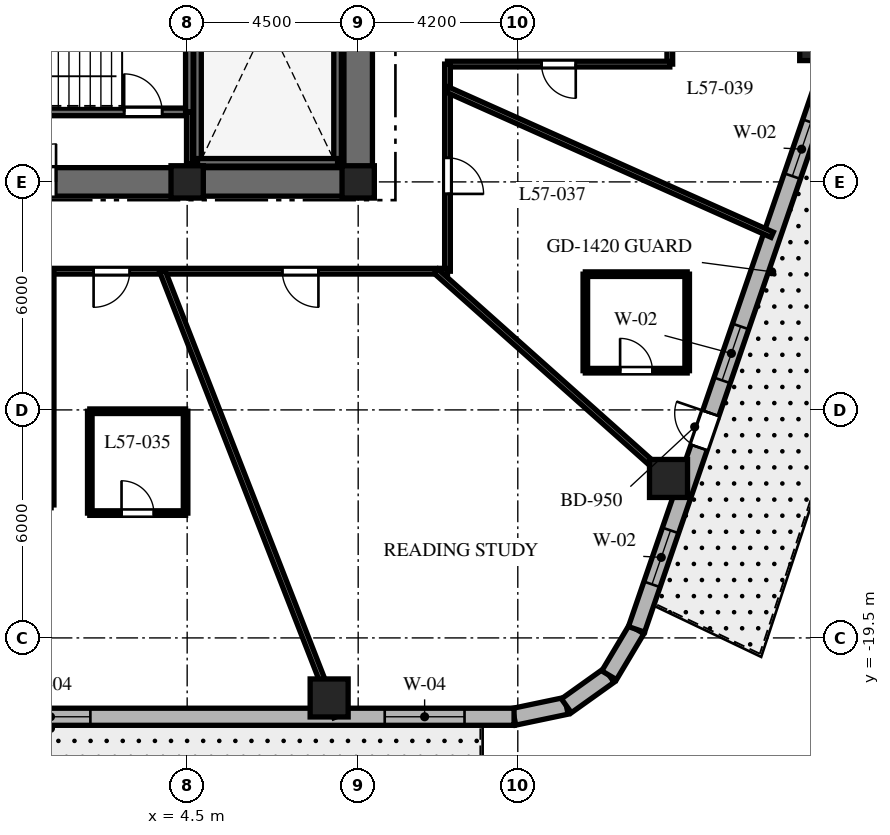
"""IFC4 building model, lengths in metres.
Left out: names, types, materials, properties, quantities, classifications, styles, units other than length and angle.
Written with IfcOpenShell. Run it as: python <this file> out.ifc"""

import sys

from ifc_helpers import new_model, si_unit, direction, frame, frame_2d, origin, origin_2d, place, context, subcontext, project, spatial, rectangle, extrude, element, fill, save


model = new_model("IFC4")
c1 = context("Model", 3, precision=1e-05, world=origin(), true_north=direction((0.0, 1.0)))
c2 = subcontext(c1, "Body", "Model", "MODEL_VIEW")
j1 = project(units=[si_unit("LENGTHUNIT", "METRE"), si_unit("PLANEANGLEUNIT", "RADIAN")], contexts=[c1])
p1 = place(None, origin())
s1 = spatial("IfcSite", under=j1, at=p1, CompositionType="ELEMENT")
p2 = place(p1, origin())
s2 = spatial("IfcBuilding", under=s1, at=p2, CompositionType="ELEMENT")
p3 = place(p2, frame((0.0, 0.0, 229.3)))
s3 = spatial("IfcBuildingStorey", under=s2, at=p3, CompositionType="ELEMENT", Elevation=229.3)
p4 = place(p3, frame((-9.375, -7.5, 0.0), z_axis=(0.0, 0.0, 1.0), x_axis=(1.0, 0.0, 0.0)))
e1 = element("IfcWall", 1, at=p4, inside=s3, PredefinedType="SHEAR", context=c2, shape_type="SweptSolid", body=[
    extrude(rectangle(XDim=18.75, YDim=0.75, at=frame_2d((9.375, 0.0))), origin(), (0.0, 0.0, 1.0), 3.8),
])
p5 = place(p4, frame((9.425, 0.0, 0.0)))
e2 = element("IfcOpeningElement", 2, at=p5, cuts=e1, PredefinedType="OPENING", context=c2, shape_type="SweptSolid", body=[
    extrude(rectangle(XDim=1.0, YDim=2.15, at=frame_2d((0.5, 1.075))), frame((0.0, 0.385, 0.0), z_axis=(0.0, -1.0, 0.0), x_axis=(1.0, 0.0, 0.0)), (0.0, 0.0, 1.0), 0.77),
])
p6 = place(p3, frame((9.0, -7.125, 0.0), z_axis=(0.0, 0.0, 1.0), x_axis=(0.0, 1.0, 0.0)))
e3 = element("IfcWall", 3, at=p6, inside=s3, PredefinedType="SHEAR", context=c2, shape_type="SweptSolid", body=[
    extrude(rectangle(XDim=14.25, YDim=0.75, at=frame_2d((7.125, 0.0))), origin(), (0.0, 0.0, 1.0), 3.8),
])
p7 = place(p6, frame((10.25, 0.0, 0.0)))
e4 = element("IfcOpeningElement", 4, at=p7, cuts=e3, PredefinedType="OPENING", context=c2, shape_type="SweptSolid", body=[
    extrude(rectangle(XDim=1.05, YDim=2.15, at=frame_2d((0.525, 1.075))), frame((0.0, 0.385, 0.0), z_axis=(0.0, -1.0, 0.0), x_axis=(1.0, 0.0, 0.0)), (0.0, 0.0, 1.0), 0.77),
])
for number, where, z_axis, x_axis in (
    (5, (4.772, -6.985, 0.0), (0.0, 0.0, 1.0), (0.0, 1.0, 0.0)),
    (6, (8.458, -6.985, 0.0), (0.0, 0.0, 1.0), (0.0, 1.0, 0.0)),
):
    element("IfcWall", number, at=place(p3, frame(where, z_axis=z_axis, x_axis=x_axis)), inside=s3, PredefinedType="SHEAR", context=c2, shape_type="SweptSolid", body=[
        extrude(rectangle(XDim=9.143, YDim=0.2, at=frame_2d((4.572, 0.0))), origin(), (0.0, 0.0, 1.0), 3.8),
    ])
p8 = place(p3, frame((4.772, -6.985, 0.0), z_axis=(0.0, 0.0, 1.0), x_axis=(1.0, 0.0, 0.0)))
e7 = element("IfcWall", 7, at=p8, inside=s3, PredefinedType="SHEAR", context=c2, shape_type="SweptSolid", body=[
    extrude(rectangle(XDim=3.686, YDim=0.2, at=frame_2d((1.843, 0.0))), origin(), (0.0, 0.0, 1.0), 3.8),
])
p9 = place(p3, frame((-4.608, -5.658, 0.0), z_axis=(0.0, 0.0, 1.0), x_axis=(1.0, 0.0, 0.0)))
e8 = element("IfcWall", 8, at=p9, inside=s3, PredefinedType="SHEAR", context=c2, shape_type="SweptSolid", body=[
    extrude(rectangle(XDim=9.166, YDim=0.2, at=frame_2d((4.583, 0.0))), origin(), (0.0, 0.0, 1.0), 3.8),
])
p10 = place(p9, frame((7.45, 0.0, 0.0)))
e9 = element("IfcOpeningElement", 9, at=p10, cuts=e8, PredefinedType="OPENING", context=c2, shape_type="SweptSolid", body=[
    extrude(rectangle(XDim=1.0, YDim=2.15, at=frame_2d((0.5, 1.075))), frame((0.0, 0.11, 0.0), z_axis=(0.0, -1.0, 0.0), x_axis=(1.0, 0.0, 0.0)), (0.0, 0.0, 1.0), 0.22),
])
p11 = place(p3, frame((4.558, -5.658, 0.0), z_axis=(0.0, 0.0, 1.0), x_axis=(0.0, 1.0, 0.0)))
e10 = element("IfcWall", 10, at=p11, inside=s3, PredefinedType="SHEAR", context=c2, shape_type="SweptSolid", body=[
    extrude(rectangle(XDim=3.686, YDim=0.2, at=frame_2d((1.843, 0.0))), origin(), (0.0, 0.0, 1.0), 3.8),
])
for number, where, z_axis, x_axis in (
    (11, (4.5, -7.5, 0.0), (0.0, 0.0, 1.0), (1.0, 0.0, 0.0)),
    (12, (9.0, -7.5, 0.0), (0.0, 0.0, 1.0), (1.0, 0.0, 0.0)),
):
    element("IfcColumn", number, at=place(p3, frame(where, z_axis=z_axis, x_axis=x_axis)), inside=s3, PredefinedType="COLUMN", context=c2, shape_type="SweptSolid", body=[
        extrude(rectangle(XDim=0.85, YDim=0.85, at=origin_2d()), origin(), (0.0, 0.0, 1.0), 3.8),
    ])
for number, where, z_axis, x_axis in (
    (13, (8.236, -21.08, 0.0), (0.0, 0.0, 1.0), (1.0, 0.0, 0.0)),
    (14, (17.166, -15.304, 0.0), (0.0, 0.0, 1.0), (1.0, 0.0, 0.0)),
    (15, (21.118, -3.807, 0.0), (0.0, 0.0, 1.0), (1.0, 0.0, 0.0)),
):
    element("IfcColumn", number, at=place(p3, frame(where, z_axis=z_axis, x_axis=x_axis)), inside=s3, PredefinedType="COLUMN", context=c2, shape_type="SweptSolid", body=[
        extrude(rectangle(XDim=1.0, YDim=1.0, at=origin_2d()), origin(), (0.0, 0.0, 1.0), 3.8),
    ])
p12 = place(p3, frame((13.102, -21.575, 0.0), z_axis=(0.0, 0.0, 1.0), x_axis=(0.978757421505, 0.205021730188, 0.0)))
e16 = element("IfcWall", 16, at=p12, inside=s3, PredefinedType="SOLIDWALL", context=c2, shape_type="SweptSolid", body=[
    extrude(rectangle(XDim=1.406, YDim=0.45, at=frame_2d((0.703, 0.0))), origin(), (0.0, 0.0, 1.0), 3.5),
])
p13 = place(p3, frame((14.478, -21.287, 0.0), z_axis=(0.0, 0.0, 1.0), x_axis=(0.813888518617, 0.58102106611, 0.0)))
e17 = element("IfcWall", 17, at=p13, inside=s3, PredefinedType="SOLIDWALL", context=c2, shape_type="SweptSolid", body=[
    extrude(rectangle(XDim=1.383, YDim=0.45, at=frame_2d((0.691, 0.0))), origin(), (0.0, 0.0, 1.0), 3.5),
])
p14 = place(p3, frame((15.604, -20.483, 0.0), z_axis=(0.0, 0.0, 1.0), x_axis=(0.512222149036, 0.858852996756, 0.0)))
e18 = element("IfcWall", 18, at=p14, inside=s3, PredefinedType="SOLIDWALL", context=c2, shape_type="SweptSolid", body=[
    extrude(rectangle(XDim=1.406, YDim=0.45, at=frame_2d((0.703, 0.0))), origin(), (0.0, 0.0, 1.0), 3.5),
])
p15 = place(p3, frame((-11.298, -21.575, 0.0), z_axis=(0.0, 0.0, 1.0), x_axis=(1.0, 0.0, 0.0)))
e19 = element("IfcWall", 19, at=p15, inside=s3, PredefinedType="SOLIDWALL", context=c2, shape_type="SweptSolid", body=[
    extrude(rectangle(XDim=24.399, YDim=0.45, at=frame_2d((12.2, 0.0))), origin(), (0.0, 0.0, 1.0), 3.5),
])
p16 = place(p15, frame((2.55, 0.0, 0.0)))
e20 = element("IfcOpeningElement", 20, at=p16, cuts=e19, PredefinedType="OPENING", context=c2, shape_type="SweptSolid", body=[
    extrude(rectangle(XDim=1.0, YDim=2.15, at=frame_2d((0.5, 1.075))), frame((0.0, 0.235, 0.0), z_axis=(0.0, -1.0, 0.0), x_axis=(1.0, 0.0, 0.0)), (0.0, 0.0, 1.0), 0.47),
])
p17 = place(p15, frame((11.151, 0.0, 0.8)))
e21 = element("IfcOpeningElement", 21, at=p17, cuts=e19, PredefinedType="OPENING", context=c2, shape_type="SweptSolid", body=[
    extrude(rectangle(XDim=2.1, YDim=1.85, at=frame_2d((1.05, 0.925))), frame((0.0, 0.235, 0.0), z_axis=(0.0, -1.0, 0.0), x_axis=(1.0, 0.0, 0.0)), (0.0, 0.0, 1.0), 0.47),
])
p18 = place(p15, frame((20.996, 0.0, 0.8)))
e22 = element("IfcOpeningElement", 22, at=p18, cuts=e19, PredefinedType="OPENING", context=c2, shape_type="SweptSolid", body=[
    extrude(rectangle(XDim=2.1, YDim=1.85, at=frame_2d((1.05, 0.925))), frame((0.0, 0.235, 0.0), z_axis=(0.0, -1.0, 0.0), x_axis=(1.0, 0.0, 0.0)), (0.0, 0.0, 1.0), 0.47),
])
p19 = place(p3, frame((16.324, -19.275, 0.0), z_axis=(0.0, 0.0, 1.0), x_axis=(0.325083142304, 0.945685439557, 0.0)))
e23 = element("IfcWall", 23, at=p19, inside=s3, PredefinedType="SOLIDWALL", context=c2, shape_type="SweptSolid", body=[
    extrude(rectangle(XDim=20.224, YDim=0.45, at=frame_2d((10.112, 0.0))), origin(), (0.0, 0.0, 1.0), 3.5),
])
p20 = place(p19, frame((5.062, 0.0, 0.0)))
e24 = element("IfcOpeningElement", 24, at=p20, cuts=e23, PredefinedType="OPENING", context=c2, shape_type="SweptSolid", body=[
    extrude(rectangle(XDim=0.95, YDim=2.15, at=frame_2d((0.475, 1.075))), frame((0.0, 0.235, 0.0), z_axis=(0.0, -1.0, 0.0), x_axis=(1.0, 0.0, 0.0)), (0.0, 0.0, 1.0), 0.47),
])
p21 = place(p19, frame((1.253, 0.0, 0.8)))
e25 = element("IfcOpeningElement", 25, at=p21, cuts=e23, PredefinedType="OPENING", context=c2, shape_type="SweptSolid", body=[
    extrude(rectangle(XDim=1.5, YDim=1.8, at=frame_2d((0.75, 0.9))), frame((0.0, 0.235, 0.0), z_axis=(0.0, -1.0, 0.0), x_axis=(1.0, 0.0, 0.0)), (0.0, 0.0, 1.0), 0.47),
])
p22 = place(p19, frame((6.929, 0.0, 0.8)))
e26 = element("IfcOpeningElement", 26, at=p22, cuts=e23, PredefinedType="OPENING", context=c2, shape_type="SweptSolid", body=[
    extrude(rectangle(XDim=1.5, YDim=1.8, at=frame_2d((0.75, 0.9))), frame((0.0, 0.235, 0.0), z_axis=(0.0, -1.0, 0.0), x_axis=(1.0, 0.0, 0.0)), (0.0, 0.0, 1.0), 0.47),
])
p23 = place(p19, frame((12.612, 0.0, 0.8)))
e27 = element("IfcOpeningElement", 27, at=p23, cuts=e23, PredefinedType="OPENING", context=c2, shape_type="SweptSolid", body=[
    extrude(rectangle(XDim=1.5, YDim=1.8, at=frame_2d((0.75, 0.9))), frame((0.0, 0.235, 0.0), z_axis=(0.0, -1.0, 0.0), x_axis=(1.0, 0.0, 0.0)), (0.0, 0.0, 1.0), 0.47),
])
p24 = place(p19, frame((17.418, 0.0, 0.8)))
e28 = element("IfcOpeningElement", 28, at=p24, cuts=e23, PredefinedType="OPENING", context=c2, shape_type="SweptSolid", body=[
    extrude(rectangle(XDim=1.5, YDim=1.8, at=frame_2d((0.75, 0.9))), frame((0.0, 0.235, 0.0), z_axis=(0.0, -1.0, 0.0), x_axis=(1.0, 0.0, 0.0)), (0.0, 0.0, 1.0), 0.47),
])
p25 = place(p3, frame((4.558, -7.02, 0.0), z_axis=(0.0, 0.0, 1.0), x_axis=(0.0, 1.0, 0.0)))
e29 = element("IfcWall", 29, at=p25, inside=s3, PredefinedType="PARTITIONING", context=c2, shape_type="SweptSolid", body=[
    extrude(rectangle(XDim=1.362, YDim=0.15, at=frame_2d((0.681, 0.0))), origin(), (0.0, 0.0, 1.0), 3.5),
])
p26 = place(p3, frame((17.2, -2.55, 0.0), z_axis=(0.0, 0.0, 1.0), x_axis=(0.0, -1.0, 0.0)))
e30 = element("IfcWall", 30, at=p26, inside=s3, PredefinedType="PARTITIONING", context=c2, shape_type="SweptSolid", body=[
    extrude(rectangle(XDim=1.85, YDim=0.15, at=frame_2d((0.925, 0.0))), origin(), (0.0, 0.0, 1.0), 2.94),
])
p27 = place(p3, frame((17.2, -4.4, 0.0), z_axis=(0.0, 0.0, 1.0), x_axis=(-1.0, 0.0, 0.0)))
e31 = element("IfcWall", 31, at=p27, inside=s3, PredefinedType="PARTITIONING", context=c2, shape_type="SweptSolid", body=[
    extrude(rectangle(XDim=5.85, YDim=0.15, at=frame_2d((2.925, 0.0))), origin(), (0.0, 0.0, 1.0), 2.94),
])
p28 = place(p27, frame((2.475, 0.0, 0.0)))
e32 = element("IfcOpeningElement", 32, at=p28, cuts=e31, PredefinedType="OPENING", context=c2, shape_type="SweptSolid", body=[
    extrude(rectangle(XDim=0.9, YDim=2.03, at=frame_2d((0.45, 1.015))), frame((0.0, 0.085, 0.0), z_axis=(0.0, -1.0, 0.0), x_axis=(1.0, 0.0, 0.0)), (0.0, 0.0, 1.0), 0.17),
])
p29 = place(p3, frame((11.35, -4.4, 0.0), z_axis=(0.0, 0.0, 1.0), x_axis=(0.0, -1.0, 0.0)))
e33 = element("IfcWall", 33, at=p29, inside=s3, PredefinedType="PARTITIONING", context=c2, shape_type="SweptSolid", body=[
    extrude(rectangle(XDim=5.45, YDim=0.15, at=frame_2d((2.725, 0.0))), origin(), (0.0, 0.0, 1.0), 2.99),
])
p30 = place(p29, frame((2.466, 0.0, 0.0)))
e34 = element("IfcOpeningElement", 34, at=p30, cuts=e33, PredefinedType="OPENING", context=c2, shape_type="SweptSolid", body=[
    extrude(rectangle(XDim=0.95, YDim=2.03, at=frame_2d((0.475, 1.015))), frame((0.0, 0.085, 0.0), z_axis=(0.0, -1.0, 0.0), x_axis=(1.0, 0.0, 0.0)), (0.0, 0.0, 1.0), 0.17),
])
p31 = place(p3, frame((11.35, -9.85, 0.0), z_axis=(0.0, 0.0, 1.0), x_axis=(-1.0, 0.0, 0.0)))
e35 = element("IfcWall", 35, at=p31, inside=s3, PredefinedType="PARTITIONING", context=c2, shape_type="SweptSolid", body=[
    extrude(rectangle(XDim=10.43, YDim=0.15, at=frame_2d((5.215, 0.0))), origin(), (0.0, 0.0, 1.0), 2.99),
])
p32 = place(p31, frame((8.362, 0.0, 0.0)))
e36 = element("IfcOpeningElement", 36, at=p32, cuts=e35, PredefinedType="OPENING", context=c2, shape_type="SweptSolid", body=[
    extrude(rectangle(XDim=0.95, YDim=2.03, at=frame_2d((0.475, 1.015))), frame((0.0, 0.085, 0.0), z_axis=(0.0, -1.0, 0.0), x_axis=(1.0, 0.0, 0.0)), (0.0, 0.0, 1.0), 0.17),
])
p33 = place(p31, frame((3.396, 0.0, 0.0)))
e37 = element("IfcOpeningElement", 37, at=p33, cuts=e35, PredefinedType="OPENING", context=c2, shape_type="SweptSolid", body=[
    extrude(rectangle(XDim=0.95, YDim=2.03, at=frame_2d((0.475, 1.015))), frame((0.0, 0.085, 0.0), z_axis=(0.0, -1.0, 0.0), x_axis=(1.0, 0.0, 0.0)), (0.0, 0.0, 1.0), 0.17),
])
p34 = place(p3, frame((0.92, -9.85, 0.0), z_axis=(0.0, 0.0, 1.0), x_axis=(0.0, -1.0, 0.0)))
e38 = element("IfcWall", 38, at=p34, inside=s3, PredefinedType="PARTITIONING", context=c2, shape_type="SweptSolid", body=[
    extrude(rectangle(XDim=6.15, YDim=0.15, at=frame_2d((3.075, 0.0))), origin(), (0.0, 0.0, 1.0), 3.026),
])
p35 = place(p3, frame((3.848, -9.85, 0.0), z_axis=(0.0, 0.0, 1.0), x_axis=(0.363921778212, -0.931429513889, 0.0)))
e39 = element("IfcWall", 39, at=p35, inside=s3, PredefinedType="PARTITIONING", context=c2, shape_type="SweptSolid", body=[
    extrude(rectangle(XDim=12.588, YDim=0.15, at=frame_2d((6.294, 0.0))), origin(), (0.0, 0.0, 1.0), 2.74),
])
p36 = place(p3, frame((11.048, -9.85, 0.0), z_axis=(0.0, 0.0, 1.0), x_axis=(0.746444434655, -0.665447748492, 0.0)))
e40 = element("IfcWall", 40, at=p36, inside=s3, PredefinedType="PARTITIONING", context=c2, shape_type="SweptSolid", body=[
    extrude(rectangle(XDim=8.732, YDim=0.15, at=frame_2d((4.366, 0.0))), origin(), (0.0, 0.0, 1.0), 2.74),
])
p37 = place(p3, frame((11.35, -5.072, 0.0), z_axis=(0.0, 0.0, 1.0), x_axis=(0.912980177983, -0.408003914944, 0.0)))
e41 = element("IfcWall", 41, at=p37, inside=s3, PredefinedType="PARTITIONING", context=c2, shape_type="SweptSolid", body=[
    extrude(rectangle(XDim=9.358, YDim=0.15, at=frame_2d((4.679, 0.0))), origin(), (0.0, 0.0, 1.0), 2.74),
])
p38 = place(p3, frame((1.938, -16.215, 0.0), z_axis=(0.0, 0.0, 1.0), x_axis=(1.0, 0.0, 0.0)))
e42 = element("IfcWall", 42, at=p38, inside=s3, PredefinedType="PARTITIONING", context=c2, shape_type="SweptSolid", body=[
    extrude(rectangle(XDim=2.52, YDim=0.12, at=frame_2d((1.26, 0.0))), origin(), (0.0, 0.0, 1.0), 3.5),
])
p39 = place(p38, frame((0.835, 0.0, 0.0)))
e43 = element("IfcOpeningElement", 43, at=p39, cuts=e42, PredefinedType="OPENING", context=c2, shape_type="SweptSolid", body=[
    extrude(rectangle(XDim=0.85, YDim=2.03, at=frame_2d((0.425, 1.015))), frame((0.0, 0.07, 0.0), z_axis=(0.0, -1.0, 0.0), x_axis=(1.0, 0.0, 0.0)), (0.0, 0.0, 1.0), 0.14),
])
p40 = place(p3, frame((4.458, -16.215, 0.0), z_axis=(0.0, 0.0, 1.0), x_axis=(0.0, 1.0, 0.0)))
e44 = element("IfcWall", 44, at=p40, inside=s3, PredefinedType="PARTITIONING", context=c2, shape_type="SweptSolid", body=[
    extrude(rectangle(XDim=2.68, YDim=0.12, at=frame_2d((1.34, 0.0))), origin(), (0.0, 0.0, 1.0), 3.026),
])
p41 = place(p3, frame((4.458, -13.535, 0.0), z_axis=(0.0, 0.0, 1.0), x_axis=(-1.0, 0.0, 0.0)))
e45 = element("IfcWall", 45, at=p41, inside=s3, PredefinedType="PARTITIONING", context=c2, shape_type="SweptSolid", body=[
    extrude(rectangle(XDim=2.52, YDim=0.12, at=frame_2d((1.26, 0.0))), origin(), (0.0, 0.0, 1.0), 3.026),
])
p42 = place(p3, frame((1.938, -13.535, 0.0), z_axis=(0.0, 0.0, 1.0), x_axis=(0.0, -1.0, 0.0)))
e46 = element("IfcWall", 46, at=p42, inside=s3, PredefinedType="PARTITIONING", context=c2, shape_type="SweptSolid", body=[
    extrude(rectangle(XDim=2.68, YDim=0.12, at=frame_2d((1.34, 0.0))), origin(), (0.0, 0.0, 1.0), 3.026),
])
p43 = place(p3, frame((14.977, -12.468, 0.0), z_axis=(0.0, 0.0, 1.0), x_axis=(1.0, 0.0, 0.0)))
e47 = element("IfcWall", 47, at=p43, inside=s3, PredefinedType="PARTITIONING", context=c2, shape_type="SweptSolid", body=[
    extrude(rectangle(XDim=2.68, YDim=0.12, at=frame_2d((1.34, 0.0))), origin(), (0.0, 0.0, 1.0), 3.5),
])
p44 = place(p43, frame((0.915, 0.0, 0.0)))
e48 = element("IfcOpeningElement", 48, at=p44, cuts=e47, PredefinedType="OPENING", context=c2, shape_type="SweptSolid", body=[
    extrude(rectangle(XDim=0.85, YDim=2.03, at=frame_2d((0.425, 1.015))), frame((0.0, 0.07, 0.0), z_axis=(0.0, -1.0, 0.0), x_axis=(1.0, 0.0, 0.0)), (0.0, 0.0, 1.0), 0.14),
])
p45 = place(p3, frame((17.657, -12.468, 0.0), z_axis=(0.0, 0.0, 1.0), x_axis=(0.0, 1.0, 0.0)))
e49 = element("IfcWall", 49, at=p45, inside=s3, PredefinedType="PARTITIONING", context=c2, shape_type="SweptSolid", body=[
    extrude(rectangle(XDim=2.54, YDim=0.12, at=frame_2d((1.27, 0.0))), origin(), (0.0, 0.0, 1.0), 3.5),
])
p46 = place(p3, frame((17.657, -9.928, 0.0), z_axis=(0.0, 0.0, 1.0), x_axis=(-1.0, 0.0, 0.0)))
e50 = element("IfcWall", 50, at=p46, inside=s3, PredefinedType="PARTITIONING", context=c2, shape_type="SweptSolid", body=[
    extrude(rectangle(XDim=2.68, YDim=0.12, at=frame_2d((1.34, 0.0))), origin(), (0.0, 0.0, 1.0), 3.072),
])
p47 = place(p3, frame((14.977, -9.928, 0.0), z_axis=(0.0, 0.0, 1.0), x_axis=(0.0, -1.0, 0.0)))
e51 = element("IfcWall", 51, at=p47, inside=s3, PredefinedType="PARTITIONING", context=c2, shape_type="SweptSolid", body=[
    extrude(rectangle(XDim=2.54, YDim=0.12, at=frame_2d((1.27, 0.0))), origin(), (0.0, 0.0, 1.0), 3.072),
])
p48 = place(p17, origin())
e52 = element("IfcWindow", 52, at=p48, inside=s3, PartitioningType="SINGLE_PANEL", PredefinedType="WINDOW", context=c2, shape_type="SweptSolid", body=[
    extrude(rectangle(XDim=2.1, YDim=1.85, at=frame_2d((1.05, 0.925))), frame((0.0, 0.03, 0.0), z_axis=(0.0, -1.0, 0.0), x_axis=(1.0, 0.0, 0.0)), (0.0, 0.0, 1.0), 0.06),
])
fill(e21, e52)
p49 = place(p18, origin())
e53 = element("IfcWindow", 53, at=p49, inside=s3, PartitioningType="SINGLE_PANEL", PredefinedType="WINDOW", context=c2, shape_type="SweptSolid", body=[
    extrude(rectangle(XDim=2.1, YDim=1.85, at=frame_2d((1.05, 0.925))), frame((0.0, 0.03, 0.0), z_axis=(0.0, -1.0, 0.0), x_axis=(1.0, 0.0, 0.0)), (0.0, 0.0, 1.0), 0.06),
])
fill(e22, e53)
p50 = place(p20, origin())
e54 = element("IfcDoor", 54, at=p50, inside=s3, OperationType="SINGLE_SWING_RIGHT", PredefinedType="DOOR", context=c2, shape_type="SweptSolid", body=[
    extrude(rectangle(XDim=0.95, YDim=2.15, at=frame_2d((0.475, 1.075))), frame((0.0, 0.025, 0.0), z_axis=(0.0, -1.0, 0.0), x_axis=(1.0, 0.0, 0.0)), (0.0, 0.0, 1.0), 0.05),
])
fill(e24, e54)
p51 = place(p21, origin())
e55 = element("IfcWindow", 55, at=p51, inside=s3, PartitioningType="SINGLE_PANEL", PredefinedType="WINDOW", context=c2, shape_type="SweptSolid", body=[
    extrude(rectangle(XDim=1.5, YDim=1.8, at=frame_2d((0.75, 0.9))), frame((0.0, 0.03, 0.0), z_axis=(0.0, -1.0, 0.0), x_axis=(1.0, 0.0, 0.0)), (0.0, 0.0, 1.0), 0.06),
])
fill(e25, e55)
p52 = place(p22, origin())
e56 = element("IfcWindow", 56, at=p52, inside=s3, PartitioningType="SINGLE_PANEL", PredefinedType="WINDOW", context=c2, shape_type="SweptSolid", body=[
    extrude(rectangle(XDim=1.5, YDim=1.8, at=frame_2d((0.75, 0.9))), frame((0.0, 0.03, 0.0), z_axis=(0.0, -1.0, 0.0), x_axis=(1.0, 0.0, 0.0)), (0.0, 0.0, 1.0), 0.06),
])
fill(e26, e56)
p53 = place(p23, origin())
e57 = element("IfcWindow", 57, at=p53, inside=s3, PartitioningType="SINGLE_PANEL", PredefinedType="WINDOW", context=c2, shape_type="SweptSolid", body=[
    extrude(rectangle(XDim=1.5, YDim=1.8, at=frame_2d((0.75, 0.9))), frame((0.0, 0.03, 0.0), z_axis=(0.0, -1.0, 0.0), x_axis=(1.0, 0.0, 0.0)), (0.0, 0.0, 1.0), 0.06),
])
fill(e27, e57)
p54 = place(p10, origin())
e58 = element("IfcDoor", 58, at=p54, inside=s3, OperationType="SINGLE_SWING_LEFT", PredefinedType="DOOR", context=c2, shape_type="SweptSolid", body=[
    extrude(rectangle(XDim=1.0, YDim=2.15, at=frame_2d((0.5, 1.075))), frame((0.0, 0.025, 0.0), z_axis=(0.0, -1.0, 0.0), x_axis=(1.0, 0.0, 0.0)), (0.0, 0.0, 1.0), 0.05),
])
fill(e9, e58)
p55 = place(p5, origin())
e59 = element("IfcDoor", 59, at=p55, inside=s3, OperationType="SINGLE_SWING_RIGHT", PredefinedType="DOOR", context=c2, shape_type="SweptSolid", body=[
    extrude(rectangle(XDim=1.0, YDim=2.15, at=frame_2d((0.5, 1.075))), frame((0.0, 0.025, 0.0), z_axis=(0.0, -1.0, 0.0), x_axis=(1.0, 0.0, 0.0)), (0.0, 0.0, 1.0), 0.05),
])
fill(e2, e59)
p56 = place(p32, origin())
e60 = element("IfcDoor", 60, at=p56, inside=s3, OperationType="SINGLE_SWING_RIGHT", PredefinedType="DOOR", context=c2, shape_type="SweptSolid", body=[
    extrude(rectangle(XDim=0.95, YDim=2.03, at=frame_2d((0.475, 1.015))), frame((0.0, 0.025, 0.0), z_axis=(0.0, -1.0, 0.0), x_axis=(1.0, 0.0, 0.0)), (0.0, 0.0, 1.0), 0.05),
])
fill(e36, e60)
p57 = place(p39, origin())
e61 = element("IfcDoor", 61, at=p57, inside=s3, OperationType="SINGLE_SWING_LEFT", PredefinedType="DOOR", context=c2, shape_type="SweptSolid", body=[
    extrude(rectangle(XDim=0.85, YDim=2.03, at=frame_2d((0.425, 1.015))), frame((0.0, 0.025, 0.0), z_axis=(0.0, -1.0, 0.0), x_axis=(1.0, 0.0, 0.0)), (0.0, 0.0, 1.0), 0.05),
])
fill(e43, e61)
p58 = place(p33, origin())
e62 = element("IfcDoor", 62, at=p58, inside=s3, OperationType="SINGLE_SWING_LEFT", PredefinedType="DOOR", context=c2, shape_type="SweptSolid", body=[
    extrude(rectangle(XDim=0.95, YDim=2.03, at=frame_2d((0.475, 1.015))), frame((0.0, 0.025, 0.0), z_axis=(0.0, -1.0, 0.0), x_axis=(1.0, 0.0, 0.0)), (0.0, 0.0, 1.0), 0.05),
])
fill(e37, e62)
p59 = place(p30, origin())
e63 = element("IfcDoor", 63, at=p59, inside=s3, OperationType="SINGLE_SWING_RIGHT", PredefinedType="DOOR", context=c2, shape_type="SweptSolid", body=[
    extrude(rectangle(XDim=0.95, YDim=2.03, at=frame_2d((0.475, 1.015))), frame((0.0, 0.025, 0.0), z_axis=(0.0, -1.0, 0.0), x_axis=(1.0, 0.0, 0.0)), (0.0, 0.0, 1.0), 0.05),
])
fill(e34, e63)
p60 = place(p44, origin())
e64 = element("IfcDoor", 64, at=p60, inside=s3, OperationType="SINGLE_SWING_LEFT", PredefinedType="DOOR", context=c2, shape_type="SweptSolid", body=[
    extrude(rectangle(XDim=0.85, YDim=2.03, at=frame_2d((0.425, 1.015))), frame((0.0, 0.025, 0.0), z_axis=(0.0, -1.0, 0.0), x_axis=(1.0, 0.0, 0.0)), (0.0, 0.0, 1.0), 0.05),
])
fill(e48, e64)
p61 = place(p28, origin())
e65 = element("IfcDoor", 65, at=p61, inside=s3, OperationType="SINGLE_SWING_LEFT", PredefinedType="DOOR", context=c2, shape_type="SweptSolid", body=[
    extrude(rectangle(XDim=0.9, YDim=2.03, at=frame_2d((0.45, 1.015))), frame((0.0, 0.025, 0.0), z_axis=(0.0, -1.0, 0.0), x_axis=(1.0, 0.0, 0.0)), (0.0, 0.0, 1.0), 0.05),
])
fill(e32, e65)
save(model, sys.argv[1])
